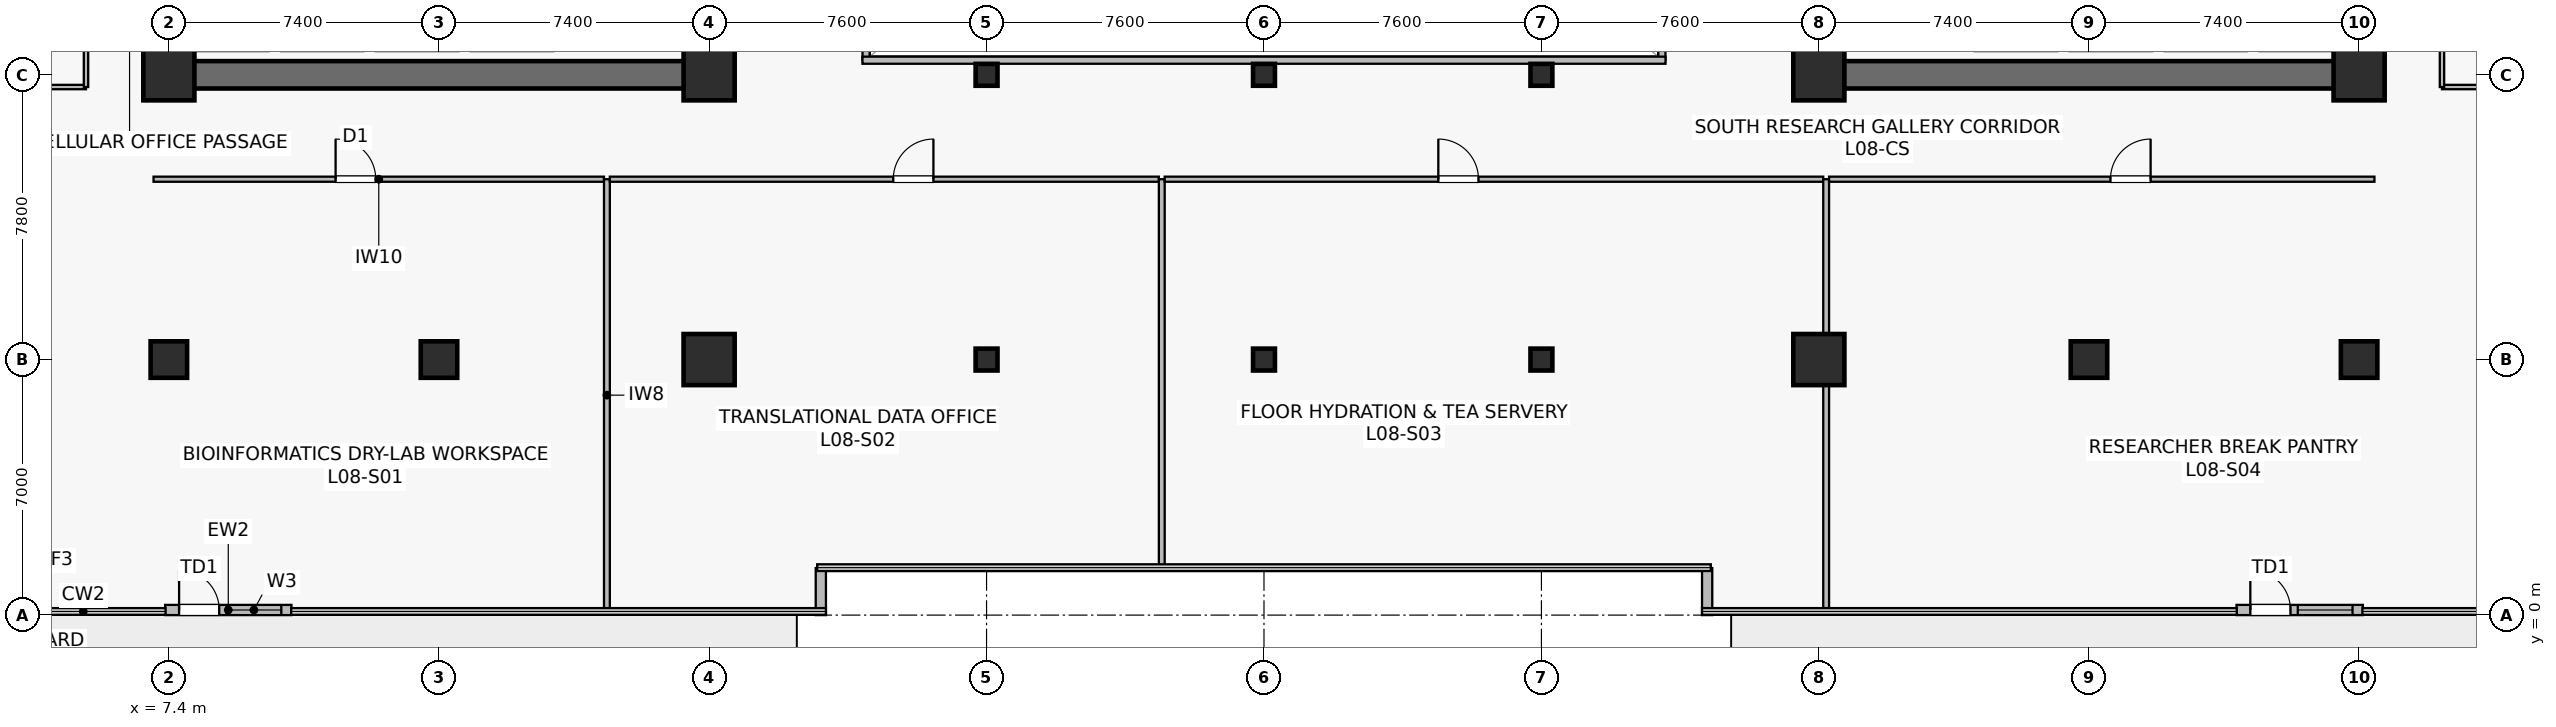
"""IFC4 building model, lengths in metres.
Left out: names, types, materials, properties, quantities, classifications, styles, units other than length and angle.
Written with IfcOpenShell. Run it as: python <this file> out.ifc"""

import sys

from ifc_helpers import new_model, si_unit, direction, frame, frame_2d, origin, origin_2d, place, context, subcontext, project, spatial, rectangle, hollow_rectangle, extrude, source, transform, mapped, element, fill, save


model = new_model("IFC4")
c1 = context("Model", 3, precision=1e-05, world=origin(), true_north=direction((0.0, 1.0)))
c2 = subcontext(c1, "Body", "Model", "MODEL_VIEW")
j1 = project(units=[si_unit("LENGTHUNIT", "METRE"), si_unit("PLANEANGLEUNIT", "RADIAN")], contexts=[c1])
p1 = place(None, origin())
s1 = spatial("IfcSite", under=j1, at=p1, CompositionType="ELEMENT")
p2 = place(p1, origin())
s2 = spatial("IfcBuilding", under=s1, at=p2, CompositionType="ELEMENT")
p3 = place(p2, frame((0.0, 0.0, 33.4)))
s3 = spatial("IfcBuildingStorey", under=s2, at=p3, CompositionType="ELEMENT", Elevation=33.4)
p4 = place(p3, frame((7.025, 14.8, 0.0), z_axis=(0.0, 0.0, 1.0), x_axis=(1.0, 0.0, 0.0)))
e1 = element("IfcWall", 1, at=p4, inside=s3, PredefinedType="SHEAR", context=c2, shape_type="SweptSolid", body=[
    extrude(rectangle(XDim=15.55, YDim=0.75, at=frame_2d((7.775, 0.0))), origin(), (0.0, 0.0, 1.0), 3.78),
])
p5 = place(p3, frame((7.4, 15.175, 0.0), z_axis=(0.0, 0.0, 1.0), x_axis=(0.0, 1.0, 0.0)))
e2 = element("IfcWall", 2, at=p5, inside=s3, PredefinedType="SHEAR", context=c2, shape_type="SweptSolid", body=[
    extrude(rectangle(XDim=18.25, YDim=0.75, at=frame_2d((9.125, 0.0))), origin(), (0.0, 0.0, 1.0), 3.78),
])
p6 = place(p3, frame((22.2, 15.175, 0.0), z_axis=(0.0, 0.0, 1.0), x_axis=(0.0, 1.0, 0.0)))
e3 = element("IfcWall", 3, at=p6, inside=s3, PredefinedType="SHEAR", context=c2, shape_type="SweptSolid", body=[
    extrude(rectangle(XDim=18.25, YDim=0.75, at=frame_2d((9.125, 0.0))), origin(), (0.0, 0.0, 1.0), 3.78),
])
p7 = place(p6, frame((3.375, 0.0, 0.0)))
e4 = element("IfcOpeningElement", 4, at=p7, cuts=e3, PredefinedType="OPENING", context=c2, shape_type="SweptSolid", body=[
    extrude(rectangle(XDim=1.42, YDim=2.2, at=frame_2d((0.71, 1.1))), frame((0.0, 0.385, 0.0), z_axis=(0.0, -1.0, 0.0), x_axis=(1.0, 0.0, 0.0)), (0.0, 0.0, 1.0), 0.77),
])
p8 = place(p3, frame((52.225, 14.8, 0.0), z_axis=(0.0, 0.0, 1.0), x_axis=(1.0, 0.0, 0.0)))
e5 = element("IfcWall", 5, at=p8, inside=s3, PredefinedType="SHEAR", context=c2, shape_type="SweptSolid", body=[
    extrude(rectangle(XDim=15.55, YDim=0.75, at=frame_2d((7.775, 0.0))), origin(), (0.0, 0.0, 1.0), 3.78),
])
p9 = place(p3, frame((52.6, 15.175, 0.0), z_axis=(0.0, 0.0, 1.0), x_axis=(0.0, 1.0, 0.0)))
e6 = element("IfcWall", 6, at=p9, inside=s3, PredefinedType="SHEAR", context=c2, shape_type="SweptSolid", body=[
    extrude(rectangle(XDim=18.25, YDim=0.75, at=frame_2d((9.125, 0.0))), origin(), (0.0, 0.0, 1.0), 3.78),
])
p10 = place(p9, frame((3.375, 0.0, 0.0)))
e7 = element("IfcOpeningElement", 7, at=p10, cuts=e6, PredefinedType="OPENING", context=c2, shape_type="SweptSolid", body=[
    extrude(rectangle(XDim=1.42, YDim=2.2, at=frame_2d((0.71, 1.1))), frame((0.0, 0.385, 0.0), z_axis=(0.0, -1.0, 0.0), x_axis=(1.0, 0.0, 0.0)), (0.0, 0.0, 1.0), 0.77),
])
p11 = place(p3, frame((67.4, 15.175, 0.0), z_axis=(0.0, 0.0, 1.0), x_axis=(0.0, 1.0, 0.0)))
e8 = element("IfcWall", 8, at=p11, inside=s3, PredefinedType="SHEAR", context=c2, shape_type="SweptSolid", body=[
    extrude(rectangle(XDim=18.25, YDim=0.75, at=frame_2d((9.125, 0.0))), origin(), (0.0, 0.0, 1.0), 3.78),
])
m1 = source(origin(), c2, "Body", "SweptSolid", [
    extrude(rectangle(XDim=1.0, YDim=1.0, at=origin_2d()), origin(), (0.0, 0.0, 1.0), 4.1),
])
p12 = place(p3, frame((14.8, 7.0, 0.0), z_axis=(0.0, 0.0, 1.0), x_axis=(1.0, 0.0, 0.0)))
e9 = element("IfcColumn", 9, at=p12, inside=s3, PredefinedType="COLUMN", context=c2, shape_type="MappedRepresentation", body=[
    mapped(m1, transform((0.0, 0.0, 0.0), scale=1.0)),
])
m2 = source(origin(), c2, "Body", "SweptSolid", [
    extrude(rectangle(XDim=1.4, YDim=1.4, at=origin_2d()), origin(), (0.0, 0.0, 1.0), 4.1),
])
for number, where, z_axis, x_axis in (
    (10, (22.2, 7.0, 0.0), (0.0, 0.0, 1.0), (1.0, 0.0, 0.0)),
    (11, (7.4, 14.8, 0.0), (0.0, 0.0, 1.0), (1.0, 0.0, 0.0)),
    (12, (22.2, 14.8, 0.0), (0.0, 0.0, 1.0), (1.0, 0.0, 0.0)),
    (13, (52.6, 7.0, 0.0), (0.0, 0.0, 1.0), (1.0, 0.0, 0.0)),
):
    element("IfcColumn", number, at=place(p3, frame(where, z_axis=z_axis, x_axis=x_axis)), inside=s3, PredefinedType="COLUMN", context=c2, shape_type="MappedRepresentation", body=[
        mapped(m2, transform((0.0, 0.0, 0.0), scale=1.0)),
    ])
p13 = place(p3, frame((60.0, 7.0, 0.0), z_axis=(0.0, 0.0, 1.0), x_axis=(1.0, 0.0, 0.0)))
e14 = element("IfcColumn", 14, at=p13, inside=s3, PredefinedType="COLUMN", context=c2, shape_type="MappedRepresentation", body=[
    mapped(m1, transform((0.0, 0.0, 0.0), scale=1.0)),
])
for number, where, z_axis, x_axis in (
    (15, (52.6, 14.8, 0.0), (0.0, 0.0, 1.0), (1.0, 0.0, 0.0)),
    (16, (67.4, 14.8, 0.0), (0.0, 0.0, 1.0), (1.0, 0.0, 0.0)),
):
    element("IfcColumn", number, at=place(p3, frame(where, z_axis=z_axis, x_axis=x_axis)), inside=s3, PredefinedType="COLUMN", context=c2, shape_type="MappedRepresentation", body=[
        mapped(m2, transform((0.0, 0.0, 0.0), scale=1.0)),
    ])
for number, where, z_axis, x_axis in (
    (17, (7.4, 7.0, 0.0), (0.0, 0.0, 1.0), (1.0, 0.0, 0.0)),
    (18, (67.4, 7.0, 0.0), (0.0, 0.0, 1.0), (1.0, 0.0, 0.0)),
):
    element("IfcColumn", number, at=place(p3, frame(where, z_axis=z_axis, x_axis=x_axis)), inside=s3, PredefinedType="COLUMN", context=c2, shape_type="MappedRepresentation", body=[
        mapped(m1, transform((0.0, 0.0, 0.0), scale=1.0)),
    ])
m3 = source(origin(), c2, "Body", "SweptSolid", [
    extrude(hollow_rectangle(XDim=0.6, YDim=0.6, WallThickness=0.028, at=origin_2d()), origin(), (0.0, 0.0, 1.0), 4.1),
])
for number, where, z_axis, x_axis in (
    (19, (29.8, 7.0, 0.0), (0.0, 0.0, 1.0), (1.0, 0.0, 0.0)),
    (20, (29.8, 14.8, 0.0), (0.0, 0.0, 1.0), (1.0, 0.0, 0.0)),
    (21, (37.4, 7.0, 0.0), (0.0, 0.0, 1.0), (1.0, 0.0, 0.0)),
    (22, (37.4, 14.8, 0.0), (0.0, 0.0, 1.0), (1.0, 0.0, 0.0)),
    (23, (45.0, 7.0, 0.0), (0.0, 0.0, 1.0), (1.0, 0.0, 0.0)),
    (24, (45.0, 14.8, 0.0), (0.0, 0.0, 1.0), (1.0, 0.0, 0.0)),
):
    element("IfcColumn", number, at=place(p3, frame(where, z_axis=z_axis, x_axis=x_axis)), inside=s3, PredefinedType="COLUMN", context=c2, shape_type="MappedRepresentation", body=[
        mapped(m3, transform((0.0, 0.0, 0.0), scale=1.0)),
    ])
p14 = place(p3, frame((7.297, 0.14, 0.0), z_axis=(0.0, 0.0, 1.0), x_axis=(1.0, 0.0, 0.0)))
e25 = element("IfcWall", 25, at=p14, inside=s3, PredefinedType="STANDARD", context=c2, shape_type="SweptSolid", body=[
    extrude(rectangle(XDim=3.461, YDim=0.28, at=frame_2d((1.73, 0.0))), origin(), (0.0, 0.0, 1.0), 3.78),
])
p15 = place(p14, frame((0.383, 0.0, 0.0)))
e26 = element("IfcOpeningElement", 26, at=p15, cuts=e25, PredefinedType="OPENING", context=c2, shape_type="SweptSolid", body=[
    extrude(rectangle(XDim=1.1, YDim=2.2, at=frame_2d((0.55, 1.1))), frame((0.0, 0.15, 0.0), z_axis=(0.0, -1.0, 0.0), x_axis=(1.0, 0.0, 0.0)), (0.0, 0.0, 1.0), 0.3),
])
p16 = place(p14, frame((1.683, 0.0, 0.9)))
e27 = element("IfcOpeningElement", 27, at=p16, cuts=e25, PredefinedType="OPENING", context=c2, shape_type="SweptSolid", body=[
    extrude(rectangle(XDim=1.5, YDim=2.2, at=frame_2d((0.75, 1.1))), frame((0.0, 0.15, 0.0), z_axis=(0.0, -1.0, 0.0), x_axis=(1.0, 0.0, 0.0)), (0.0, 0.0, 1.0), 0.3),
])
p17 = place(p3, frame((64.042, 0.14, 0.0), z_axis=(0.0, 0.0, 1.0), x_axis=(1.0, 0.0, 0.0)))
e28 = element("IfcWall", 28, at=p17, inside=s3, PredefinedType="STANDARD", context=c2, shape_type="SweptSolid", body=[
    extrude(rectangle(XDim=3.461, YDim=0.28, at=frame_2d((1.73, 0.0))), origin(), (0.0, 0.0, 1.0), 3.78),
])
p18 = place(p17, frame((0.378, 0.0, 0.0)))
e29 = element("IfcOpeningElement", 29, at=p18, cuts=e28, PredefinedType="OPENING", context=c2, shape_type="SweptSolid", body=[
    extrude(rectangle(XDim=1.1, YDim=2.2, at=frame_2d((0.55, 1.1))), frame((0.0, 0.15, 0.0), z_axis=(0.0, -1.0, 0.0), x_axis=(1.0, 0.0, 0.0)), (0.0, 0.0, 1.0), 0.3),
])
p19 = place(p17, frame((1.678, 0.0, 0.9)))
e30 = element("IfcOpeningElement", 30, at=p19, cuts=e28, PredefinedType="OPENING", context=c2, shape_type="SweptSolid", body=[
    extrude(rectangle(XDim=1.5, YDim=2.2, at=frame_2d((0.75, 1.1))), frame((0.0, 0.15, 0.0), z_axis=(0.0, -1.0, 0.0), x_axis=(1.0, 0.0, 0.0)), (0.0, 0.0, 1.0), 0.3),
])
for number, where, z_axis, x_axis in (
    (31, (25.26, 0.0, 0.0), (0.0, 0.0, 1.0), (0.0, 1.0, 0.0)),
    (32, (49.54, 1.288, 0.0), (0.0, 0.0, 1.0), (0.0, -1.0, 0.0)),
):
    element("IfcWall", number, at=place(p3, frame(where, z_axis=z_axis, x_axis=x_axis)), inside=s3, PredefinedType="STANDARD", context=c2, shape_type="SweptSolid", body=[
        extrude(rectangle(XDim=1.288, YDim=0.28, at=frame_2d((0.644, 0.0))), origin(), (0.0, 0.0, 1.0), 3.78),
    ])
p20 = place(p3, frame((26.5, 15.2, 0.0), z_axis=(0.0, 0.0, 1.0), x_axis=(0.0, 1.0, 0.0)))
e33 = element("IfcWall", 33, at=p20, inside=s3, PredefinedType="SOLIDWALL", context=c2, shape_type="SweptSolid", body=[
    extrude(rectangle(XDim=18.2, YDim=0.195, at=frame_2d((9.1, 0.0))), origin(), (0.0, 0.0, 1.0), 3.78),
])
p21 = place(p20, frame((1.8, 0.0, 0.9)))
e34 = element("IfcOpeningElement", 34, at=p21, cuts=e33, PredefinedType="OPENING", context=c2, shape_type="SweptSolid", body=[
    extrude(rectangle(XDim=1.5, YDim=1.4, at=frame_2d((0.75, 0.7))), frame((0.0, 0.107, 0.0), z_axis=(0.0, -1.0, 0.0), x_axis=(1.0, 0.0, 0.0)), (0.0, 0.0, 1.0), 0.215),
])
p22 = place(p20, frame((13.2, 0.0, 0.9)))
e35 = element("IfcOpeningElement", 35, at=p22, cuts=e33, PredefinedType="OPENING", context=c2, shape_type="SweptSolid", body=[
    extrude(rectangle(XDim=1.5, YDim=1.4, at=frame_2d((0.75, 0.7))), frame((0.0, 0.107, 0.0), z_axis=(0.0, -1.0, 0.0), x_axis=(1.0, 0.0, 0.0)), (0.0, 0.0, 1.0), 0.215),
])
p23 = place(p3, frame((48.3, 15.2, 0.0), z_axis=(0.0, 0.0, 1.0), x_axis=(0.0, 1.0, 0.0)))
e36 = element("IfcWall", 36, at=p23, inside=s3, PredefinedType="SOLIDWALL", context=c2, shape_type="SweptSolid", body=[
    extrude(rectangle(XDim=18.2, YDim=0.195, at=frame_2d((9.1, 0.0))), origin(), (0.0, 0.0, 1.0), 3.78),
])
p24 = place(p23, frame((1.8, 0.0, 0.9)))
e37 = element("IfcOpeningElement", 37, at=p24, cuts=e36, PredefinedType="OPENING", context=c2, shape_type="SweptSolid", body=[
    extrude(rectangle(XDim=1.5, YDim=1.4, at=frame_2d((0.75, 0.7))), frame((0.0, 0.107, 0.0), z_axis=(0.0, -1.0, 0.0), x_axis=(1.0, 0.0, 0.0)), (0.0, 0.0, 1.0), 0.215),
])
p25 = place(p23, frame((13.2, 0.0, 0.9)))
e38 = element("IfcOpeningElement", 38, at=p25, cuts=e36, PredefinedType="OPENING", context=c2, shape_type="SweptSolid", body=[
    extrude(rectangle(XDim=1.5, YDim=1.4, at=frame_2d((0.75, 0.7))), frame((0.0, 0.107, 0.0), z_axis=(0.0, -1.0, 0.0), x_axis=(1.0, 0.0, 0.0)), (0.0, 0.0, 1.0), 0.215),
])
p26 = place(p3, frame((26.4, 15.2, 0.0), z_axis=(0.0, 0.0, 1.0), x_axis=(1.0, 0.0, 0.0)))
e39 = element("IfcWall", 39, at=p26, inside=s3, PredefinedType="SOLIDWALL", context=c2, shape_type="SweptSolid", body=[
    extrude(rectangle(XDim=22.0, YDim=0.195, at=frame_2d((11.0, 0.0))), origin(), (0.0, 0.0, 1.0), 3.78),
])
p27 = place(p3, frame((6.98, 11.94, 0.0), z_axis=(0.0, 0.0, 1.0), x_axis=(1.0, 0.0, 0.0)))
e40 = element("IfcWall", 40, at=p27, inside=s3, PredefinedType="PARTITIONING", context=c2, shape_type="SweptSolid", body=[
    extrude(rectangle(XDim=12.34, YDim=0.14, at=frame_2d((6.17, 0.0))), origin(), (0.0, 0.0, 1.0), 3.065),
])
p28 = place(p27, frame((4.988, 0.0, 0.0)))
e41 = element("IfcOpeningElement", 41, at=p28, cuts=e40, PredefinedType="OPENING", context=c2, shape_type="SweptSolid", body=[
    extrude(rectangle(XDim=1.1, YDim=2.18, at=frame_2d((0.55, 1.09))), frame((0.0, 0.08, 0.0), z_axis=(0.0, -1.0, 0.0), x_axis=(1.0, 0.0, 0.0)), (0.0, 0.0, 1.0), 0.16),
])
p29 = place(p3, frame((19.4, 0.11, 0.0), z_axis=(0.0, 0.0, 1.0), x_axis=(0.0, 1.0, 0.0)))
e42 = element("IfcWall", 42, at=p29, inside=s3, PredefinedType="PARTITIONING", context=c2, shape_type="SweptSolid", body=[
    extrude(rectangle(XDim=11.83, YDim=0.16, at=frame_2d((5.915, 0.0))), origin(), (0.0, 0.0, 1.0), 3.015),
])
p30 = place(p3, frame((19.48, 11.94, 0.0), z_axis=(0.0, 0.0, 1.0), x_axis=(1.0, 0.0, 0.0)))
e43 = element("IfcWall", 43, at=p30, inside=s3, PredefinedType="PARTITIONING", context=c2, shape_type="SweptSolid", body=[
    extrude(rectangle(XDim=15.04, YDim=0.14, at=frame_2d((7.52, 0.0))), origin(), (0.0, 0.0, 1.0), 3.065),
])
p31 = place(p30, frame((7.764, 0.0, 0.0)))
e44 = element("IfcOpeningElement", 44, at=p31, cuts=e43, PredefinedType="OPENING", context=c2, shape_type="SweptSolid", body=[
    extrude(rectangle(XDim=1.1, YDim=2.18, at=frame_2d((0.55, 1.09))), frame((0.0, 0.08, 0.0), z_axis=(0.0, -1.0, 0.0), x_axis=(1.0, 0.0, 0.0)), (0.0, 0.0, 1.0), 0.16),
])
p32 = place(p3, frame((34.6, 1.31, 0.0), z_axis=(0.0, 0.0, 1.0), x_axis=(0.0, 1.0, 0.0)))
e45 = element("IfcWall", 45, at=p32, inside=s3, PredefinedType="PARTITIONING", context=c2, shape_type="SweptSolid", body=[
    extrude(rectangle(XDim=10.63, YDim=0.16, at=frame_2d((5.315, 0.0))), origin(), (0.0, 0.0, 1.0), 3.015),
])
p33 = place(p3, frame((34.68, 11.94, 0.0), z_axis=(0.0, 0.0, 1.0), x_axis=(1.0, 0.0, 0.0)))
e46 = element("IfcWall", 46, at=p33, inside=s3, PredefinedType="PARTITIONING", context=c2, shape_type="SweptSolid", body=[
    extrude(rectangle(XDim=18.04, YDim=0.14, at=frame_2d((9.02, 0.0))), origin(), (0.0, 0.0, 1.0), 3.065),
])
p34 = place(p33, frame((7.496, 0.0, 0.0)))
e47 = element("IfcOpeningElement", 47, at=p34, cuts=e46, PredefinedType="OPENING", context=c2, shape_type="SweptSolid", body=[
    extrude(rectangle(XDim=1.1, YDim=2.18, at=frame_2d((0.55, 1.09))), frame((0.0, 0.08, 0.0), z_axis=(0.0, -1.0, 0.0), x_axis=(1.0, 0.0, 0.0)), (0.0, 0.0, 1.0), 0.16),
])
p35 = place(p3, frame((52.8, 0.11, 0.0), z_axis=(0.0, 0.0, 1.0), x_axis=(0.0, 1.0, 0.0)))
e48 = element("IfcWall", 48, at=p35, inside=s3, PredefinedType="PARTITIONING", context=c2, shape_type="SweptSolid", body=[
    extrude(rectangle(XDim=11.83, YDim=0.16, at=frame_2d((5.915, 0.0))), origin(), (0.0, 0.0, 1.0), 3.015),
])
p36 = place(p3, frame((52.88, 11.94, 0.0), z_axis=(0.0, 0.0, 1.0), x_axis=(1.0, 0.0, 0.0)))
e49 = element("IfcWall", 49, at=p36, inside=s3, PredefinedType="PARTITIONING", context=c2, shape_type="SweptSolid", body=[
    extrude(rectangle(XDim=14.94, YDim=0.14, at=frame_2d((7.47, 0.0))), origin(), (0.0, 0.0, 1.0), 3.065),
])
p37 = place(p36, frame((7.708, 0.0, 0.0)))
e50 = element("IfcOpeningElement", 50, at=p37, cuts=e49, PredefinedType="OPENING", context=c2, shape_type="SweptSolid", body=[
    extrude(rectangle(XDim=1.1, YDim=2.18, at=frame_2d((0.55, 1.09))), frame((0.0, 0.08, 0.0), z_axis=(0.0, -1.0, 0.0), x_axis=(1.0, 0.0, 0.0)), (0.0, 0.0, 1.0), 0.16),
])
p38 = place(p3, frame((0.11, 14.465, 0.0), z_axis=(0.0, 0.0, 1.0), x_axis=(1.0, 0.0, 0.0)))
e51 = element("IfcWall", 51, at=p38, inside=s3, PredefinedType="PARTITIONING", context=c2, shape_type="SweptSolid", body=[
    extrude(rectangle(XDim=5.02, YDim=0.12, at=frame_2d((2.51, 0.0))), origin(), (0.0, 0.0, 1.0), 3.78),
])
p39 = place(p3, frame((5.13, 14.465, 0.0), z_axis=(0.0, 0.0, 1.0), x_axis=(0.0, 1.0, 0.0)))
e52 = element("IfcWall", 52, at=p39, inside=s3, PredefinedType="PARTITIONING", context=c2, shape_type="SweptSolid", body=[
    extrude(rectangle(XDim=5.275, YDim=0.12, at=frame_2d((2.637, 0.0))), origin(), (0.0, 0.0, 1.0), 3.78),
])
p40 = place(p39, frame((2.188, 0.0, 0.0)))
e53 = element("IfcOpeningElement", 53, at=p40, cuts=e52, PredefinedType="OPENING", context=c2, shape_type="SweptSolid", body=[
    extrude(rectangle(XDim=0.9, YDim=2.1, at=frame_2d((0.45, 1.05))), frame((0.0, 0.07, 0.0), z_axis=(0.0, -1.0, 0.0), x_axis=(1.0, 0.0, 0.0)), (0.0, 0.0, 1.0), 0.14),
])
p41 = place(p3, frame((69.67, 14.465, 0.0), z_axis=(0.0, 0.0, 1.0), x_axis=(1.0, 0.0, 0.0)))
e54 = element("IfcWall", 54, at=p41, inside=s3, PredefinedType="PARTITIONING", context=c2, shape_type="SweptSolid", body=[
    extrude(rectangle(XDim=5.02, YDim=0.12, at=frame_2d((2.51, 0.0))), origin(), (0.0, 0.0, 1.0), 3.78),
])
p42 = place(p3, frame((69.67, 14.465, 0.0), z_axis=(0.0, 0.0, 1.0), x_axis=(0.0, 1.0, 0.0)))
e55 = element("IfcWall", 55, at=p42, inside=s3, PredefinedType="PARTITIONING", context=c2, shape_type="SweptSolid", body=[
    extrude(rectangle(XDim=8.675, YDim=0.12, at=frame_2d((4.337, 0.0))), origin(), (0.0, 0.0, 1.0), 3.78),
])
p43 = place(p42, frame((3.887, 0.0, 0.0)))
e56 = element("IfcOpeningElement", 56, at=p43, cuts=e55, PredefinedType="OPENING", context=c2, shape_type="SweptSolid", body=[
    extrude(rectangle(XDim=0.9, YDim=2.1, at=frame_2d((0.45, 1.05))), frame((0.0, 0.07, 0.0), z_axis=(0.0, -1.0, 0.0), x_axis=(1.0, 0.0, 0.0)), (0.0, 0.0, 1.0), 0.14),
])
m4 = source(origin(), c2, "Body", "SweptSolid", [
    extrude(rectangle(XDim=1.1, YDim=2.2, at=frame_2d((0.55, 1.1))), frame((0.0, 0.025, 0.0), z_axis=(0.0, -1.0, 0.0), x_axis=(1.0, 0.0, 0.0)), (0.0, 0.0, 1.0), 0.05),
])
p44 = place(p15, origin())
e57 = element("IfcDoor", 57, at=p44, inside=s3, OperationType="SINGLE_SWING_LEFT", PredefinedType="DOOR", context=c2, shape_type="MappedRepresentation", body=[
    mapped(m4, transform((0.0, 0.0, 0.0), scale=1.0)),
])
fill(e26, e57)
m5 = source(origin(), c2, "Body", "SweptSolid", [
    extrude(rectangle(XDim=1.5, YDim=2.2, at=frame_2d((0.75, 1.1))), frame((0.0, 0.03, 0.0), z_axis=(0.0, -1.0, 0.0), x_axis=(1.0, 0.0, 0.0)), (0.0, 0.0, 1.0), 0.06),
])
p45 = place(p16, origin())
e58 = element("IfcWindow", 58, at=p45, inside=s3, PartitioningType="SINGLE_PANEL", PredefinedType="WINDOW", context=c2, shape_type="MappedRepresentation", body=[
    mapped(m5, transform((0.0, 0.0, 0.0), scale=1.0)),
])
fill(e27, e58)
p46 = place(p18, origin())
e59 = element("IfcDoor", 59, at=p46, inside=s3, OperationType="SINGLE_SWING_LEFT", PredefinedType="DOOR", context=c2, shape_type="MappedRepresentation", body=[
    mapped(m4, transform((0.0, 0.0, 0.0), scale=1.0)),
])
fill(e29, e59)
p47 = place(p19, origin())
e60 = element("IfcWindow", 60, at=p47, inside=s3, PartitioningType="SINGLE_PANEL", PredefinedType="WINDOW", context=c2, shape_type="MappedRepresentation", body=[
    mapped(m5, transform((0.0, 0.0, 0.0), scale=1.0)),
])
fill(e30, e60)
m6 = source(origin(), c2, "Body", "SweptSolid", [
    extrude(rectangle(XDim=1.1, YDim=2.18, at=frame_2d((0.55, 1.09))), frame((0.0, 0.025, 0.0), z_axis=(0.0, -1.0, 0.0), x_axis=(1.0, 0.0, 0.0)), (0.0, 0.0, 1.0), 0.05),
])
p48 = place(p28, origin())
e61 = element("IfcDoor", 61, at=p48, inside=s3, OperationType="SINGLE_SWING_LEFT", PredefinedType="DOOR", context=c2, shape_type="MappedRepresentation", body=[
    mapped(m6, transform((0.0, 0.0, 0.0), scale=1.0)),
])
fill(e41, e61)
p49 = place(p31, origin())
e62 = element("IfcDoor", 62, at=p49, inside=s3, OperationType="SINGLE_SWING_RIGHT", PredefinedType="DOOR", context=c2, shape_type="MappedRepresentation", body=[
    mapped(m6, transform((0.0, 0.0, 0.0), scale=1.0)),
])
fill(e44, e62)
p50 = place(p34, origin())
e63 = element("IfcDoor", 63, at=p50, inside=s3, OperationType="SINGLE_SWING_LEFT", PredefinedType="DOOR", context=c2, shape_type="MappedRepresentation", body=[
    mapped(m6, transform((0.0, 0.0, 0.0), scale=1.0)),
])
fill(e47, e63)
p51 = place(p37, origin())
e64 = element("IfcDoor", 64, at=p51, inside=s3, OperationType="SINGLE_SWING_RIGHT", PredefinedType="DOOR", context=c2, shape_type="MappedRepresentation", body=[
    mapped(m6, transform((0.0, 0.0, 0.0), scale=1.0)),
])
fill(e50, e64)
save(model, sys.argv[1])
